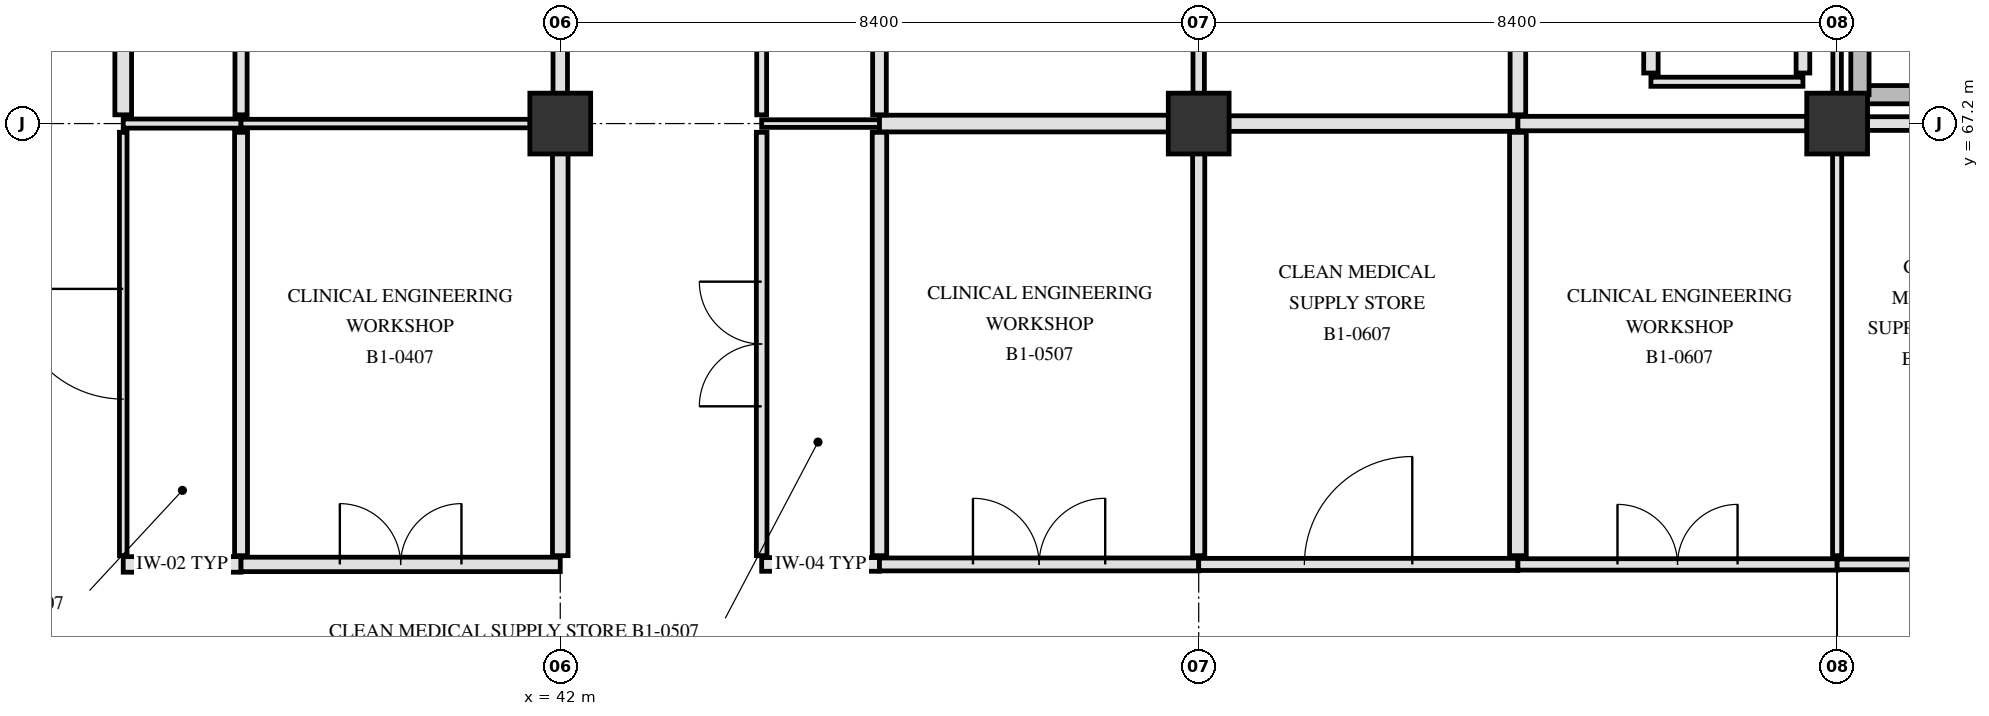
"""IFC4 building model, lengths in metres.
Left out: names, types, materials, properties, quantities, classifications, styles, units other than length and angle.
Written with IfcOpenShell. Run it as: python <this file> out.ifc"""

import sys

from ifc_helpers import new_model, si_unit, direction, frame, frame_2d, origin, origin_2d, place, context, subcontext, project, spatial, rectangle, extrude, element, fill, save


model = new_model("IFC4")
c1 = context("Model", 3, precision=1e-05, world=origin(), true_north=direction((0.0, 1.0)))
c2 = subcontext(c1, "Body", "Model", "MODEL_VIEW")
j1 = project(units=[si_unit("LENGTHUNIT", "METRE"), si_unit("PLANEANGLEUNIT", "RADIAN")], contexts=[c1])
p1 = place(None, origin())
s1 = spatial("IfcSite", under=j1, at=p1, CompositionType="ELEMENT")
p2 = place(p1, origin())
s2 = spatial("IfcBuilding", under=s1, at=p2, CompositionType="ELEMENT")
p3 = place(p2, frame((0.0, 0.0, -5.4)))
s3 = spatial("IfcBuildingStorey", under=s2, at=p3, CompositionType="ELEMENT", Elevation=-5.4)
for number, where, z_axis, x_axis in (
    (1, (42.0, 67.2, 0.0), (0.0, 0.0, 1.0), (1.0, 0.0, 0.0)),
    (2, (50.4, 67.2, 0.0), (0.0, 0.0, 1.0), (1.0, 0.0, 0.0)),
    (3, (58.8, 67.2, 0.0), (0.0, 0.0, 1.0), (1.0, 0.0, 0.0)),
):
    element("IfcColumn", number, at=place(p3, frame(where, z_axis=z_axis, x_axis=x_axis)), inside=s3, PredefinedType="COLUMN", context=c2, shape_type="SweptSolid", body=[
        extrude(rectangle(XDim=0.8, YDim=0.8, at=origin_2d()), origin(), (0.0, 0.0, 1.0), 5.4),
    ])
p4 = place(p3, frame((59.1, 67.58, 0.0), z_axis=(0.0, 0.0, 1.0), x_axis=(1.0, 0.0, 0.0)))
e4 = element("IfcWall", 4, at=p4, inside=s3, PredefinedType="SHEAR", context=c2, shape_type="SweptSolid", body=[
    extrude(rectangle(XDim=7.82, YDim=0.24, at=frame_2d((3.91, 0.0))), origin(), (0.0, 0.0, 1.0), 5.08),
])
p5 = place(p3, frame((59.1, 67.58, 0.0), z_axis=(0.0, 0.0, 1.0), x_axis=(0.0, 1.0, 0.0)))
e5 = element("IfcWall", 5, at=p5, inside=s3, PredefinedType="SHEAR", context=c2, shape_type="SweptSolid", body=[
    extrude(rectangle(XDim=3.32, YDim=0.24, at=frame_2d((1.66, 0.0))), origin(), (0.0, 0.0, 1.0), 5.08),
])
p6 = place(p3, frame((36.25, 61.4, 0.0), z_axis=(0.0, 0.0, 1.0), x_axis=(1.0, 0.0, 0.0)))
e6 = element("IfcWall", 6, at=p6, inside=s3, PredefinedType="PARTITIONING", context=c2, shape_type="SweptSolid", body=[
    extrude(rectangle(XDim=1.55, YDim=0.205, at=frame_2d((0.775, 0.0))), origin(), (0.0, 0.0, 1.0), 5.07),
])
p7 = place(p3, frame((37.8, 61.4, 0.0), z_axis=(0.0, 0.0, 1.0), x_axis=(1.0, 0.0, 0.0)))
e7 = element("IfcWall", 7, at=p7, inside=s3, PredefinedType="PARTITIONING", context=c2, shape_type="SweptSolid", body=[
    extrude(rectangle(XDim=4.2, YDim=0.19, at=frame_2d((2.1, 0.0))), origin(), (0.0, 0.0, 1.0), 4.47),
])
p8 = place(p7, frame((1.3, 0.0, 0.0)))
e8 = element("IfcOpeningElement", 8, at=p8, cuts=e7, PredefinedType="OPENING", context=c2, shape_type="SweptSolid", body=[
    extrude(rectangle(XDim=1.6, YDim=2.25, at=frame_2d((0.8, 1.125))), frame((0.0, 0.105, 0.0), z_axis=(0.0, -1.0, 0.0), x_axis=(1.0, 0.0, 0.0)), (0.0, 0.0, 1.0), 0.21),
])
p9 = place(p3, frame((44.65, 61.4, 0.0), z_axis=(0.0, 0.0, 1.0), x_axis=(1.0, 0.0, 0.0)))
e9 = element("IfcWall", 9, at=p9, inside=s3, PredefinedType="PARTITIONING", context=c2, shape_type="SweptSolid", body=[
    extrude(rectangle(XDim=1.55, YDim=0.18, at=frame_2d((0.775, 0.0))), origin(), (0.0, 0.0, 1.0), 5.07),
])
p10 = place(p3, frame((46.2, 61.4, 0.0), z_axis=(0.0, 0.0, 1.0), x_axis=(1.0, 0.0, 0.0)))
e10 = element("IfcWall", 10, at=p10, inside=s3, PredefinedType="PARTITIONING", context=c2, shape_type="SweptSolid", body=[
    extrude(rectangle(XDim=4.2, YDim=0.17, at=frame_2d((2.1, 0.0))), origin(), (0.0, 0.0, 1.0), 4.47),
])
p11 = place(p10, frame((1.23, 0.0, 0.0)))
e11 = element("IfcOpeningElement", 11, at=p11, cuts=e10, PredefinedType="OPENING", context=c2, shape_type="SweptSolid", body=[
    extrude(rectangle(XDim=1.74, YDim=2.24, at=frame_2d((0.87, 1.12))), frame((0.0, 0.095, 0.0), z_axis=(0.0, -1.0, 0.0), x_axis=(1.0, 0.0, 0.0)), (0.0, 0.0, 1.0), 0.19),
])
p12 = place(p3, frame((50.4, 61.4, 0.0), z_axis=(0.0, 0.0, 1.0), x_axis=(1.0, 0.0, 0.0)))
e12 = element("IfcWall", 12, at=p12, inside=s3, PredefinedType="PARTITIONING", context=c2, shape_type="SweptSolid", body=[
    extrude(rectangle(XDim=4.2, YDim=0.16, at=frame_2d((2.1, 0.0))), origin(), (0.0, 0.0, 1.0), 4.47),
])
p13 = place(p12, frame((1.39, 0.0, 0.0)))
e13 = element("IfcOpeningElement", 13, at=p13, cuts=e12, PredefinedType="OPENING", context=c2, shape_type="SweptSolid", body=[
    extrude(rectangle(XDim=1.42, YDim=2.22, at=frame_2d((0.71, 1.11))), frame((0.0, 0.09, 0.0), z_axis=(0.0, -1.0, 0.0), x_axis=(1.0, 0.0, 0.0)), (0.0, 0.0, 1.0), 0.18),
])
p14 = place(p3, frame((54.6, 61.4, 0.0), z_axis=(0.0, 0.0, 1.0), x_axis=(1.0, 0.0, 0.0)))
e14 = element("IfcWall", 14, at=p14, inside=s3, PredefinedType="PARTITIONING", context=c2, shape_type="SweptSolid", body=[
    extrude(rectangle(XDim=4.2, YDim=0.15, at=frame_2d((2.1, 0.0))), origin(), (0.0, 0.0, 1.0), 4.47),
])
p15 = place(p14, frame((1.31, 0.0, 0.0)))
e15 = element("IfcOpeningElement", 15, at=p15, cuts=e14, PredefinedType="OPENING", context=c2, shape_type="SweptSolid", body=[
    extrude(rectangle(XDim=1.58, YDim=2.22, at=frame_2d((0.79, 1.11))), frame((0.0, 0.085, 0.0), z_axis=(0.0, -1.0, 0.0), x_axis=(1.0, 0.0, 0.0)), (0.0, 0.0, 1.0), 0.17),
])
p16 = place(p3, frame((58.8, 61.4, 0.0), z_axis=(0.0, 0.0, 1.0), x_axis=(1.0, 0.0, 0.0)))
e16 = element("IfcWall", 16, at=p16, inside=s3, PredefinedType="PARTITIONING", context=c2, shape_type="SweptSolid", body=[
    extrude(rectangle(XDim=4.2, YDim=0.14, at=frame_2d((2.1, 0.0))), origin(), (0.0, 0.0, 1.0), 4.47),
])
p17 = place(p16, frame((1.525, 0.0, 0.0)))
e17 = element("IfcOpeningElement", 17, at=p17, cuts=e16, PredefinedType="OPENING", context=c2, shape_type="SweptSolid", body=[
    extrude(rectangle(XDim=1.15, YDim=2.15, at=frame_2d((0.575, 1.075))), frame((0.0, 0.08, 0.0), z_axis=(0.0, -1.0, 0.0), x_axis=(1.0, 0.0, 0.0)), (0.0, 0.0, 1.0), 0.16),
])
p18 = place(p3, frame((36.25, 67.2, 0.0), z_axis=(0.0, 0.0, 1.0), x_axis=(1.0, 0.0, 0.0)))
e18 = element("IfcWall", 18, at=p18, inside=s3, PredefinedType="PARTITIONING", context=c2, shape_type="SweptSolid", body=[
    extrude(rectangle(XDim=1.55, YDim=0.12, at=frame_2d((0.775, 0.0))), origin(), (0.0, 0.0, 1.0), 4.42),
])
p19 = place(p3, frame((37.8, 67.2, 0.0), z_axis=(0.0, 0.0, 1.0), x_axis=(1.0, 0.0, 0.0)))
e19 = element("IfcWall", 19, at=p19, inside=s3, PredefinedType="PARTITIONING", context=c2, shape_type="SweptSolid", body=[
    extrude(rectangle(XDim=3.805, YDim=0.112, at=frame_2d((1.902, 0.0))), origin(), (0.0, 0.0, 1.0), 4.42),
])
p20 = place(p3, frame((44.65, 67.2, 0.0), z_axis=(0.0, 0.0, 1.0), x_axis=(1.0, 0.0, 0.0)))
e20 = element("IfcWall", 20, at=p20, inside=s3, PredefinedType="PARTITIONING", context=c2, shape_type="SweptSolid", body=[
    extrude(rectangle(XDim=1.55, YDim=0.1, at=frame_2d((0.775, 0.0))), origin(), (0.0, 0.0, 1.0), 4.42),
])
p21 = place(p3, frame((46.2, 67.2, 0.0), z_axis=(0.0, 0.0, 1.0), x_axis=(1.0, 0.0, 0.0)))
e21 = element("IfcWall", 21, at=p21, inside=s3, PredefinedType="PARTITIONING", context=c2, shape_type="SweptSolid", body=[
    extrude(rectangle(XDim=3.805, YDim=0.22, at=frame_2d((1.902, 0.0))), origin(), (0.0, 0.0, 1.0), 4.42),
])
p22 = place(p3, frame((50.795, 67.2, 0.0), z_axis=(0.0, 0.0, 1.0), x_axis=(1.0, 0.0, 0.0)))
e22 = element("IfcWall", 22, at=p22, inside=s3, PredefinedType="PARTITIONING", context=c2, shape_type="SweptSolid", body=[
    extrude(rectangle(XDim=3.805, YDim=0.205, at=frame_2d((1.903, 0.0))), origin(), (0.0, 0.0, 1.0), 4.42),
])
p23 = place(p3, frame((54.6, 67.2, 0.0), z_axis=(0.0, 0.0, 1.0), x_axis=(1.0, 0.0, 0.0)))
e23 = element("IfcWall", 23, at=p23, inside=s3, PredefinedType="PARTITIONING", context=c2, shape_type="SweptSolid", body=[
    extrude(rectangle(XDim=3.805, YDim=0.19, at=frame_2d((1.902, 0.0))), origin(), (0.0, 0.0, 1.0), 4.42),
])
p24 = place(p3, frame((59.195, 67.2, 0.0), z_axis=(0.0, 0.0, 1.0), x_axis=(1.0, 0.0, 0.0)))
e24 = element("IfcWall", 24, at=p24, inside=s3, PredefinedType="PARTITIONING", context=c2, shape_type="SweptSolid", body=[
    extrude(rectangle(XDim=3.805, YDim=0.18, at=frame_2d((1.902, 0.0))), origin(), (0.0, 0.0, 1.0), 4.42),
])
p25 = place(p3, frame((56.35, 67.75, 0.0), z_axis=(0.0, 0.0, 1.0), x_axis=(1.0, 0.0, 0.0)))
e25 = element("IfcWall", 25, at=p25, inside=s3, PredefinedType="PARTITIONING", context=c2, shape_type="SweptSolid", body=[
    extrude(rectangle(XDim=2.0, YDim=0.12, at=frame_2d((1.0, 0.0))), origin(), (0.0, 0.0, 1.0), 5.07),
])
p26 = place(p3, frame((36.25, 61.515, 0.0), z_axis=(0.0, 0.0, 1.0), x_axis=(0.0, 1.0, 0.0)))
e26 = element("IfcWall", 26, at=p26, inside=s3, PredefinedType="PARTITIONING", context=c2, shape_type="SweptSolid", body=[
    extrude(rectangle(XDim=5.57, YDim=0.1, at=frame_2d((2.785, 0.0))), origin(), (0.0, 0.0, 1.0), 4.42),
])
p27 = place(p26, frame((2.06, 0.0, 0.0)))
e27 = element("IfcOpeningElement", 27, at=p27, cuts=e26, PredefinedType="OPENING", context=c2, shape_type="SweptSolid", body=[
    extrude(rectangle(XDim=1.45, YDim=2.2, at=frame_2d((0.725, 1.1))), frame((0.0, 0.06, 0.0), z_axis=(0.0, -1.0, 0.0), x_axis=(1.0, 0.0, 0.0)), (0.0, 0.0, 1.0), 0.12),
])
p28 = place(p3, frame((36.25, 67.315, 0.0), z_axis=(0.0, 0.0, 1.0), x_axis=(0.0, 1.0, 0.0)))
e28 = element("IfcWall", 28, at=p28, inside=s3, PredefinedType="PARTITIONING", context=c2, shape_type="SweptSolid", body=[
    extrude(rectangle(XDim=8.17, YDim=0.22, at=frame_2d((4.085, 0.0))), origin(), (0.0, 0.0, 1.0), 4.42),
])
p29 = place(p28, frame((3.185, 0.0, 0.0)))
e29 = element("IfcOpeningElement", 29, at=p29, cuts=e28, PredefinedType="OPENING", context=c2, shape_type="SweptSolid", body=[
    extrude(rectangle(XDim=1.8, YDim=2.25, at=frame_2d((0.9, 1.125))), frame((0.0, 0.12, 0.0), z_axis=(0.0, -1.0, 0.0), x_axis=(1.0, 0.0, 0.0)), (0.0, 0.0, 1.0), 0.24),
])
p30 = place(p3, frame((37.8, 61.515, 0.0), z_axis=(0.0, 0.0, 1.0), x_axis=(0.0, 1.0, 0.0)))
e30 = element("IfcWall", 30, at=p30, inside=s3, PredefinedType="PARTITIONING", context=c2, shape_type="SweptSolid", body=[
    extrude(rectangle(XDim=5.57, YDim=0.17, at=frame_2d((2.785, 0.0))), origin(), (0.0, 0.0, 1.0), 4.42),
])
p31 = place(p3, frame((37.8, 67.315, 0.0), z_axis=(0.0, 0.0, 1.0), x_axis=(0.0, 1.0, 0.0)))
e31 = element("IfcWall", 31, at=p31, inside=s3, PredefinedType="PARTITIONING", context=c2, shape_type="SweptSolid", body=[
    extrude(rectangle(XDim=8.17, YDim=0.16, at=frame_2d((4.085, 0.0))), origin(), (0.0, 0.0, 1.0), 4.42),
])
p32 = place(p3, frame((42.0, 61.515, 0.0), z_axis=(0.0, 0.0, 1.0), x_axis=(0.0, 1.0, 0.0)))
e32 = element("IfcWall", 32, at=p32, inside=s3, PredefinedType="PARTITIONING", context=c2, shape_type="SweptSolid", body=[
    extrude(rectangle(XDim=5.29, YDim=0.205, at=frame_2d((2.645, 0.0))), origin(), (0.0, 0.0, 1.0), 4.47),
])
p33 = place(p3, frame((42.0, 67.595, 0.0), z_axis=(0.0, 0.0, 1.0), x_axis=(0.0, 1.0, 0.0)))
e33 = element("IfcWall", 33, at=p33, inside=s3, PredefinedType="PARTITIONING", context=c2, shape_type="SweptSolid", body=[
    extrude(rectangle(XDim=7.61, YDim=0.19, at=frame_2d((3.805, 0.0))), origin(), (0.0, 0.0, 1.0), 4.47),
])
p34 = place(p3, frame((44.65, 61.515, 0.0), z_axis=(0.0, 0.0, 1.0), x_axis=(0.0, 1.0, 0.0)))
e34 = element("IfcWall", 34, at=p34, inside=s3, PredefinedType="PARTITIONING", context=c2, shape_type="SweptSolid", body=[
    extrude(rectangle(XDim=5.57, YDim=0.14, at=frame_2d((2.785, 0.0))), origin(), (0.0, 0.0, 1.0), 4.42),
])
p35 = place(p34, frame((1.965, 0.0, 0.0)))
e35 = element("IfcOpeningElement", 35, at=p35, cuts=e34, PredefinedType="OPENING", context=c2, shape_type="SweptSolid", body=[
    extrude(rectangle(XDim=1.64, YDim=2.28, at=frame_2d((0.82, 1.14))), frame((0.0, 0.08, 0.0), z_axis=(0.0, -1.0, 0.0), x_axis=(1.0, 0.0, 0.0)), (0.0, 0.0, 1.0), 0.16),
])
p36 = place(p3, frame((44.65, 67.315, 0.0), z_axis=(0.0, 0.0, 1.0), x_axis=(0.0, 1.0, 0.0)))
e36 = element("IfcWall", 36, at=p36, inside=s3, PredefinedType="PARTITIONING", context=c2, shape_type="SweptSolid", body=[
    extrude(rectangle(XDim=8.17, YDim=0.13, at=frame_2d((4.085, 0.0))), origin(), (0.0, 0.0, 1.0), 4.42),
])
p37 = place(p36, frame((3.165, 0.0, 0.0)))
e37 = element("IfcOpeningElement", 37, at=p37, cuts=e36, PredefinedType="OPENING", context=c2, shape_type="SweptSolid", body=[
    extrude(rectangle(XDim=1.84, YDim=2.28, at=frame_2d((0.92, 1.14))), frame((0.0, 0.075, 0.0), z_axis=(0.0, -1.0, 0.0), x_axis=(1.0, 0.0, 0.0)), (0.0, 0.0, 1.0), 0.15),
])
p38 = place(p3, frame((46.2, 61.515, 0.0), z_axis=(0.0, 0.0, 1.0), x_axis=(0.0, 1.0, 0.0)))
e38 = element("IfcWall", 38, at=p38, inside=s3, PredefinedType="PARTITIONING", context=c2, shape_type="SweptSolid", body=[
    extrude(rectangle(XDim=5.57, YDim=0.19, at=frame_2d((2.785, 0.0))), origin(), (0.0, 0.0, 1.0), 4.42),
])
p39 = place(p3, frame((46.2, 67.315, 0.0), z_axis=(0.0, 0.0, 1.0), x_axis=(0.0, 1.0, 0.0)))
e39 = element("IfcWall", 39, at=p39, inside=s3, PredefinedType="PARTITIONING", context=c2, shape_type="SweptSolid", body=[
    extrude(rectangle(XDim=8.17, YDim=0.18, at=frame_2d((4.085, 0.0))), origin(), (0.0, 0.0, 1.0), 4.42),
])
p40 = place(p3, frame((50.4, 61.515, 0.0), z_axis=(0.0, 0.0, 1.0), x_axis=(0.0, 1.0, 0.0)))
e40 = element("IfcWall", 40, at=p40, inside=s3, PredefinedType="PARTITIONING", context=c2, shape_type="SweptSolid", body=[
    extrude(rectangle(XDim=5.29, YDim=0.16, at=frame_2d((2.645, 0.0))), origin(), (0.0, 0.0, 1.0), 4.47),
])
p41 = place(p3, frame((50.4, 67.595, 0.0), z_axis=(0.0, 0.0, 1.0), x_axis=(0.0, 1.0, 0.0)))
e41 = element("IfcWall", 41, at=p41, inside=s3, PredefinedType="PARTITIONING", context=c2, shape_type="SweptSolid", body=[
    extrude(rectangle(XDim=7.61, YDim=0.15, at=frame_2d((3.805, 0.0))), origin(), (0.0, 0.0, 1.0), 4.47),
])
p42 = place(p3, frame((54.6, 61.515, 0.0), z_axis=(0.0, 0.0, 1.0), x_axis=(0.0, 1.0, 0.0)))
e42 = element("IfcWall", 42, at=p42, inside=s3, PredefinedType="PARTITIONING", context=c2, shape_type="SweptSolid", body=[
    extrude(rectangle(XDim=5.57, YDim=0.22, at=frame_2d((2.785, 0.0))), origin(), (0.0, 0.0, 1.0), 4.42),
])
p43 = place(p3, frame((54.6, 67.315, 0.0), z_axis=(0.0, 0.0, 1.0), x_axis=(0.0, 1.0, 0.0)))
e43 = element("IfcWall", 43, at=p43, inside=s3, PredefinedType="PARTITIONING", context=c2, shape_type="SweptSolid", body=[
    extrude(rectangle(XDim=8.17, YDim=0.205, at=frame_2d((4.085, 0.0))), origin(), (0.0, 0.0, 1.0), 4.42),
])
p44 = place(p3, frame((56.35, 67.865, 0.0), z_axis=(0.0, 0.0, 1.0), x_axis=(0.0, 1.0, 0.0)))
e44 = element("IfcWall", 44, at=p44, inside=s3, PredefinedType="PARTITIONING", context=c2, shape_type="SweptSolid", body=[
    extrude(rectangle(XDim=7.62, YDim=0.19, at=frame_2d((3.81, 0.0))), origin(), (0.0, 0.0, 1.0), 4.42),
])
p45 = place(p3, frame((58.35, 67.865, 0.0), z_axis=(0.0, 0.0, 1.0), x_axis=(0.0, 1.0, 0.0)))
e45 = element("IfcWall", 45, at=p45, inside=s3, PredefinedType="PARTITIONING", context=c2, shape_type="SweptSolid", body=[
    extrude(rectangle(XDim=7.735, YDim=0.18, at=frame_2d((3.868, 0.0))), origin(), (0.0, 0.0, 1.0), 4.42),
])
p46 = place(p3, frame((58.8, 61.515, 0.0), z_axis=(0.0, 0.0, 1.0), x_axis=(0.0, 1.0, 0.0)))
e46 = element("IfcWall", 46, at=p46, inside=s3, PredefinedType="PARTITIONING", context=c2, shape_type="SweptSolid", body=[
    extrude(rectangle(XDim=5.29, YDim=0.12, at=frame_2d((2.645, 0.0))), origin(), (0.0, 0.0, 1.0), 4.47),
])
p47 = place(p3, frame((58.8, 67.595, 0.0), z_axis=(0.0, 0.0, 1.0), x_axis=(0.0, 1.0, 0.0)))
e47 = element("IfcWall", 47, at=p47, inside=s3, PredefinedType="PARTITIONING", context=c2, shape_type="SweptSolid", body=[
    extrude(rectangle(XDim=7.61, YDim=0.112, at=frame_2d((3.805, 0.0))), origin(), (0.0, 0.0, 1.0), 4.47),
])
p48 = place(p27, origin())
e48 = element("IfcDoor", 48, at=p48, inside=s3, OperationType="SINGLE_SWING_RIGHT", PredefinedType="DOOR", context=c2, shape_type="SweptSolid", body=[
    extrude(rectangle(XDim=1.45, YDim=2.2, at=frame_2d((0.725, 1.1))), frame((0.0, 0.025, 0.0), z_axis=(0.0, -1.0, 0.0), x_axis=(1.0, 0.0, 0.0)), (0.0, 0.0, 1.0), 0.05),
])
fill(e27, e48)
p49 = place(p8, origin())
e49 = element("IfcDoor", 49, at=p49, inside=s3, OperationType="DOUBLE_SWING_LEFT", PredefinedType="DOOR", context=c2, shape_type="SweptSolid", body=[
    extrude(rectangle(XDim=1.6, YDim=2.25, at=frame_2d((0.8, 1.125))), frame((0.0, 0.025, 0.0), z_axis=(0.0, -1.0, 0.0), x_axis=(1.0, 0.0, 0.0)), (0.0, 0.0, 1.0), 0.05),
])
fill(e8, e49)
p50 = place(p35, origin())
e50 = element("IfcDoor", 50, at=p50, inside=s3, OperationType="DOUBLE_SWING_LEFT", PredefinedType="DOOR", context=c2, shape_type="SweptSolid", body=[
    extrude(rectangle(XDim=1.64, YDim=2.28, at=frame_2d((0.82, 1.14))), frame((0.0, 0.025, 0.0), z_axis=(0.0, -1.0, 0.0), x_axis=(1.0, 0.0, 0.0)), (0.0, 0.0, 1.0), 0.05),
])
fill(e35, e50)
p51 = place(p11, origin())
e51 = element("IfcDoor", 51, at=p51, inside=s3, OperationType="DOUBLE_SWING_RIGHT", PredefinedType="DOOR", context=c2, shape_type="SweptSolid", body=[
    extrude(rectangle(XDim=1.74, YDim=2.24, at=frame_2d((0.87, 1.12))), frame((0.0, 0.025, 0.0), z_axis=(0.0, -1.0, 0.0), x_axis=(1.0, 0.0, 0.0)), (0.0, 0.0, 1.0), 0.05),
])
fill(e11, e51)
p52 = place(p13, origin())
e52 = element("IfcDoor", 52, at=p52, inside=s3, OperationType="SINGLE_SWING_RIGHT", PredefinedType="DOOR", context=c2, shape_type="SweptSolid", body=[
    extrude(rectangle(XDim=1.42, YDim=2.22, at=frame_2d((0.71, 1.11))), frame((0.0, 0.025, 0.0), z_axis=(0.0, -1.0, 0.0), x_axis=(1.0, 0.0, 0.0)), (0.0, 0.0, 1.0), 0.05),
])
fill(e13, e52)
p53 = place(p15, origin())
e53 = element("IfcDoor", 53, at=p53, inside=s3, OperationType="DOUBLE_SWING_LEFT", PredefinedType="DOOR", context=c2, shape_type="SweptSolid", body=[
    extrude(rectangle(XDim=1.58, YDim=2.22, at=frame_2d((0.79, 1.11))), frame((0.0, 0.025, 0.0), z_axis=(0.0, -1.0, 0.0), x_axis=(1.0, 0.0, 0.0)), (0.0, 0.0, 1.0), 0.05),
])
fill(e15, e53)
save(model, sys.argv[1])
